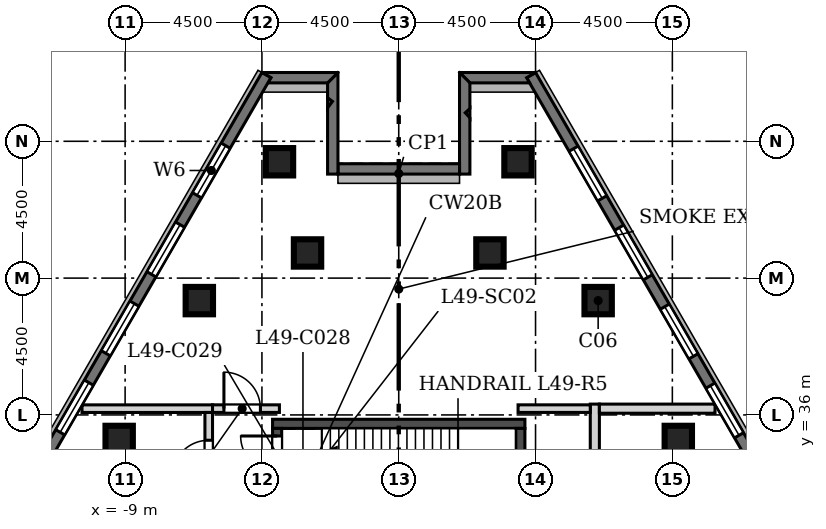
"""IFC4 building model, lengths in metres.
Left out: names, types, materials, properties, quantities, classifications, styles, units other than length and angle.
Written with IfcOpenShell. Run it as: python <this file> out.ifc"""

import sys

from ifc_helpers import new_model, si_unit, direction, frame, frame_2d, origin, origin_2d, place, context, subcontext, project, spatial, polyline, rectangle, outline, extrude, element, fill, save


model = new_model("IFC4")
c1 = context("Model", 3, precision=1e-05, world=origin(), true_north=direction((0.0, 1.0)))
c2 = subcontext(c1, "Body", "Model", "MODEL_VIEW")
j1 = project(units=[si_unit("LENGTHUNIT", "METRE"), si_unit("PLANEANGLEUNIT", "RADIAN")], contexts=[c1])
p1 = place(None, origin())
s1 = spatial("IfcSite", under=j1, at=p1, CompositionType="ELEMENT")
p2 = place(p1, origin())
s2 = spatial("IfcBuilding", under=s1, at=p2, CompositionType="ELEMENT")
p3 = place(p2, frame((0.0, 0.0, 218.1)))
s3 = spatial("IfcBuildingStorey", under=s2, at=p3, CompositionType="ELEMENT", Elevation=218.1)
for number, where, z_axis, x_axis in (
    (1, (9.196, 35.194, 0.0), (0.0, 0.0, 1.0), (1.0, 0.0, 0.0)),
    (2, (6.559, 39.76, 0.0), (0.0, 0.0, 1.0), (1.0, 0.0, 0.0)),
    (3, (3.923, 44.327, 0.0), (0.0, 0.0, 1.0), (1.0, 0.0, 0.0)),
    (4, (3.0, 41.327, 0.0), (0.0, 0.0, 1.0), (1.0, 0.0, 0.0)),
    (5, (-3.0, 41.327, 0.0), (0.0, 0.0, 1.0), (1.0, 0.0, 0.0)),
    (6, (-3.923, 44.327, 0.0), (0.0, 0.0, 1.0), (1.0, 0.0, 0.0)),
    (7, (-6.559, 39.76, 0.0), (0.0, 0.0, 1.0), (1.0, 0.0, 0.0)),
    (8, (-9.196, 35.194, 0.0), (0.0, 0.0, 1.0), (1.0, 0.0, 0.0)),
):
    element("IfcColumn", number, at=place(p3, frame(where, z_axis=z_axis, x_axis=x_axis)), inside=s3, PredefinedType="COLUMN", context=c2, shape_type="SweptSolid", body=[
        extrude(rectangle(XDim=0.9, YDim=0.9, at=origin_2d()), origin(), (0.0, 0.0, 1.0), 5.4),
    ])
p4 = place(p3, frame((27.139, 7.709, 0.0), z_axis=(0.0, 0.0, 1.0), x_axis=(-0.500000533701, 0.866025095652, 0.0)))
e9 = element("IfcWall", 9, at=p4, inside=s3, PredefinedType="SOLIDWALL", context=c2, shape_type="SweptSolid", body=[
    extrude(rectangle(XDim=45.573, YDim=0.34, at=frame_2d((22.787, 0.0))), origin(), (0.0, 0.0, 1.0), 5.0),
])
p5 = place(p4, frame((1.893, 0.0, 0.9)))
e10 = element("IfcOpeningElement", 10, at=p5, cuts=e9, PredefinedType="OPENING", context=c2, shape_type="SweptSolid", body=[
    extrude(rectangle(XDim=1.885, YDim=3.0, at=frame_2d((0.942, 1.5))), frame((0.0, 0.18, 0.0), z_axis=(0.0, -1.0, 0.0), x_axis=(1.0, 0.0, 0.0)), (0.0, 0.0, 1.0), 0.36),
])
p6 = place(p4, frame((4.893, 0.0, 0.9)))
e11 = element("IfcOpeningElement", 11, at=p6, cuts=e9, PredefinedType="OPENING", context=c2, shape_type="SweptSolid", body=[
    extrude(rectangle(XDim=1.885, YDim=3.0, at=frame_2d((0.942, 1.5))), frame((0.0, 0.18, 0.0), z_axis=(0.0, -1.0, 0.0), x_axis=(1.0, 0.0, 0.0)), (0.0, 0.0, 1.0), 0.36),
])
p7 = place(p4, frame((7.893, 0.0, 0.9)))
e12 = element("IfcOpeningElement", 12, at=p7, cuts=e9, PredefinedType="OPENING", context=c2, shape_type="SweptSolid", body=[
    extrude(rectangle(XDim=1.885, YDim=3.0, at=frame_2d((0.942, 1.5))), frame((0.0, 0.18, 0.0), z_axis=(0.0, -1.0, 0.0), x_axis=(1.0, 0.0, 0.0)), (0.0, 0.0, 1.0), 0.36),
])
p8 = place(p4, frame((10.893, 0.0, 0.9)))
e13 = element("IfcOpeningElement", 13, at=p8, cuts=e9, PredefinedType="OPENING", context=c2, shape_type="SweptSolid", body=[
    extrude(rectangle(XDim=1.885, YDim=3.0, at=frame_2d((0.942, 1.5))), frame((0.0, 0.18, 0.0), z_axis=(0.0, -1.0, 0.0), x_axis=(1.0, 0.0, 0.0)), (0.0, 0.0, 1.0), 0.36),
])
p9 = place(p4, frame((13.893, 0.0, 0.9)))
e14 = element("IfcOpeningElement", 14, at=p9, cuts=e9, PredefinedType="OPENING", context=c2, shape_type="SweptSolid", body=[
    extrude(rectangle(XDim=1.885, YDim=3.0, at=frame_2d((0.942, 1.5))), frame((0.0, 0.18, 0.0), z_axis=(0.0, -1.0, 0.0), x_axis=(1.0, 0.0, 0.0)), (0.0, 0.0, 1.0), 0.36),
])
p10 = place(p4, frame((16.893, 0.0, 0.9)))
e15 = element("IfcOpeningElement", 15, at=p10, cuts=e9, PredefinedType="OPENING", context=c2, shape_type="SweptSolid", body=[
    extrude(rectangle(XDim=1.885, YDim=3.0, at=frame_2d((0.942, 1.5))), frame((0.0, 0.18, 0.0), z_axis=(0.0, -1.0, 0.0), x_axis=(1.0, 0.0, 0.0)), (0.0, 0.0, 1.0), 0.36),
])
p11 = place(p4, frame((19.893, 0.0, 0.9)))
e16 = element("IfcOpeningElement", 16, at=p11, cuts=e9, PredefinedType="OPENING", context=c2, shape_type="SweptSolid", body=[
    extrude(rectangle(XDim=1.885, YDim=3.0, at=frame_2d((0.942, 1.5))), frame((0.0, 0.18, 0.0), z_axis=(0.0, -1.0, 0.0), x_axis=(1.0, 0.0, 0.0)), (0.0, 0.0, 1.0), 0.36),
])
p12 = place(p4, frame((22.893, 0.0, 0.9)))
e17 = element("IfcOpeningElement", 17, at=p12, cuts=e9, PredefinedType="OPENING", context=c2, shape_type="SweptSolid", body=[
    extrude(rectangle(XDim=1.885, YDim=3.0, at=frame_2d((0.942, 1.5))), frame((0.0, 0.18, 0.0), z_axis=(0.0, -1.0, 0.0), x_axis=(1.0, 0.0, 0.0)), (0.0, 0.0, 1.0), 0.36),
])
p13 = place(p4, frame((25.893, 0.0, 0.9)))
e18 = element("IfcOpeningElement", 18, at=p13, cuts=e9, PredefinedType="OPENING", context=c2, shape_type="SweptSolid", body=[
    extrude(rectangle(XDim=1.885, YDim=3.0, at=frame_2d((0.942, 1.5))), frame((0.0, 0.18, 0.0), z_axis=(0.0, -1.0, 0.0), x_axis=(1.0, 0.0, 0.0)), (0.0, 0.0, 1.0), 0.36),
])
p14 = place(p4, frame((28.893, 0.0, 0.9)))
e19 = element("IfcOpeningElement", 19, at=p14, cuts=e9, PredefinedType="OPENING", context=c2, shape_type="SweptSolid", body=[
    extrude(rectangle(XDim=1.885, YDim=3.0, at=frame_2d((0.942, 1.5))), frame((0.0, 0.18, 0.0), z_axis=(0.0, -1.0, 0.0), x_axis=(1.0, 0.0, 0.0)), (0.0, 0.0, 1.0), 0.36),
])
p15 = place(p4, frame((31.893, 0.0, 0.9)))
e20 = element("IfcOpeningElement", 20, at=p15, cuts=e9, PredefinedType="OPENING", context=c2, shape_type="SweptSolid", body=[
    extrude(rectangle(XDim=1.885, YDim=3.0, at=frame_2d((0.942, 1.5))), frame((0.0, 0.18, 0.0), z_axis=(0.0, -1.0, 0.0), x_axis=(1.0, 0.0, 0.0)), (0.0, 0.0, 1.0), 0.36),
])
p16 = place(p4, frame((34.893, 0.0, 0.9)))
e21 = element("IfcOpeningElement", 21, at=p16, cuts=e9, PredefinedType="OPENING", context=c2, shape_type="SweptSolid", body=[
    extrude(rectangle(XDim=1.885, YDim=3.0, at=frame_2d((0.942, 1.5))), frame((0.0, 0.18, 0.0), z_axis=(0.0, -1.0, 0.0), x_axis=(1.0, 0.0, 0.0)), (0.0, 0.0, 1.0), 0.36),
])
p17 = place(p4, frame((37.893, 0.0, 0.9)))
e22 = element("IfcOpeningElement", 22, at=p17, cuts=e9, PredefinedType="OPENING", context=c2, shape_type="SweptSolid", body=[
    extrude(rectangle(XDim=1.885, YDim=3.0, at=frame_2d((0.942, 1.5))), frame((0.0, 0.18, 0.0), z_axis=(0.0, -1.0, 0.0), x_axis=(1.0, 0.0, 0.0)), (0.0, 0.0, 1.0), 0.36),
])
p18 = place(p4, frame((40.893, 0.0, 0.9)))
e23 = element("IfcOpeningElement", 23, at=p18, cuts=e9, PredefinedType="OPENING", context=c2, shape_type="SweptSolid", body=[
    extrude(rectangle(XDim=1.885, YDim=3.0, at=frame_2d((0.942, 1.5))), frame((0.0, 0.18, 0.0), z_axis=(0.0, -1.0, 0.0), x_axis=(1.0, 0.0, 0.0)), (0.0, 0.0, 1.0), 0.36),
])
p19 = place(p3, origin())
e24 = element("IfcWall", 24, at=p19, inside=s3, PredefinedType="SOLIDWALL", context=c2, shape_type="SweptSolid", body=[
    extrude(outline(polyline([(1.999, 47.262), (4.501, 47.262), (4.501, 47.262), (4.206, 47.091), (4.305, 46.921), (2.34, 46.921), (1.999, 47.262), (1.999, 47.262)])), origin(), (0.0, 0.0, 1.0), 5.0),
])
p20 = place(p3, origin())
e25 = element("IfcWall", 25, at=p20, inside=s3, PredefinedType="SOLIDWALL", context=c2, shape_type="SweptSolid", body=[
    extrude(outline(polyline([(2.341, 45.771), (2.188, 45.938), (2.341, 46.077), (2.341, 45.771)])), origin(), (0.0, 0.0, 1.0), 4.4),
])
p21 = place(p3, origin())
e26 = element("IfcWall", 26, at=p21, inside=s3, PredefinedType="SOLIDWALL", context=c2, shape_type="SweptSolid", body=[
    extrude(outline(polyline([(2.0, 43.921), (2.0, 47.263), (2.0, 47.263), (2.341, 46.922), (2.341, 46.077), (2.188, 45.938), (2.341, 45.771), (2.341, 43.921), (2.0, 43.921)])), origin(), (0.0, 0.0, 1.0), 5.0),
])
p22 = place(p3, frame((2.0, 44.092, 0.0), z_axis=(0.0, 0.0, 1.0), x_axis=(-1.0, 0.0, 0.0)))
e27 = element("IfcWall", 27, at=p22, inside=s3, PredefinedType="SOLIDWALL", context=c2, shape_type="SweptSolid", body=[
    extrude(rectangle(XDim=4.0, YDim=0.34, at=frame_2d((2.0, 0.0))), origin(), (0.0, 0.0, 1.0), 5.0),
])
p23 = place(p3, origin())
e28 = element("IfcWall", 28, at=p23, inside=s3, PredefinedType="SOLIDWALL", context=c2, shape_type="SweptSolid", body=[
    extrude(outline(polyline([(-2.341, 46.432), (-2.18, 46.312), (-2.341, 46.098), (-2.341, 46.432)])), origin(), (0.0, 0.0, 1.0), 4.4),
])
p24 = place(p3, origin())
e29 = element("IfcWall", 29, at=p24, inside=s3, PredefinedType="SOLIDWALL", context=c2, shape_type="SweptSolid", body=[
    extrude(outline(polyline([(-2.0, 43.921), (-2.341, 43.921), (-2.341, 46.098), (-2.18, 46.312), (-2.341, 46.432), (-2.341, 46.922), (-2.0, 47.263), (-2.0, 47.263), (-2.0, 43.921)])), origin(), (0.0, 0.0, 1.0), 5.0),
])
p25 = place(p3, origin())
e30 = element("IfcWall", 30, at=p25, inside=s3, PredefinedType="SOLIDWALL", context=c2, shape_type="SweptSolid", body=[
    extrude(outline(polyline([(-4.305, 46.921), (-4.206, 47.091), (-4.501, 47.262), (-4.501, 47.262), (-1.999, 47.262), (-1.999, 47.262), (-2.34, 46.921), (-4.305, 46.921)])), origin(), (0.0, 0.0, 1.0), 5.0),
])
p26 = place(p3, frame((-4.353, 47.177, 0.0), z_axis=(0.0, 0.0, 1.0), x_axis=(-0.500000533701, -0.866025095652, 0.0)))
e31 = element("IfcWall", 31, at=p26, inside=s3, PredefinedType="SOLIDWALL", context=c2, shape_type="SweptSolid", body=[
    extrude(rectangle(XDim=45.573, YDim=0.34, at=frame_2d((22.787, 0.0))), origin(), (0.0, 0.0, 1.0), 5.0),
])
p27 = place(p26, frame((2.68, 0.0, 0.9)))
e32 = element("IfcOpeningElement", 32, at=p27, cuts=e31, PredefinedType="OPENING", context=c2, shape_type="SweptSolid", body=[
    extrude(rectangle(XDim=1.885, YDim=3.0, at=frame_2d((0.942, 1.5))), frame((0.0, 0.18, 0.0), z_axis=(0.0, -1.0, 0.0), x_axis=(1.0, 0.0, 0.0)), (0.0, 0.0, 1.0), 0.36),
])
p28 = place(p26, frame((5.68, 0.0, 0.9)))
e33 = element("IfcOpeningElement", 33, at=p28, cuts=e31, PredefinedType="OPENING", context=c2, shape_type="SweptSolid", body=[
    extrude(rectangle(XDim=1.885, YDim=3.0, at=frame_2d((0.942, 1.5))), frame((0.0, 0.18, 0.0), z_axis=(0.0, -1.0, 0.0), x_axis=(1.0, 0.0, 0.0)), (0.0, 0.0, 1.0), 0.36),
])
p29 = place(p26, frame((8.68, 0.0, 0.9)))
e34 = element("IfcOpeningElement", 34, at=p29, cuts=e31, PredefinedType="OPENING", context=c2, shape_type="SweptSolid", body=[
    extrude(rectangle(XDim=1.885, YDim=3.0, at=frame_2d((0.942, 1.5))), frame((0.0, 0.18, 0.0), z_axis=(0.0, -1.0, 0.0), x_axis=(1.0, 0.0, 0.0)), (0.0, 0.0, 1.0), 0.36),
])
p30 = place(p26, frame((11.68, 0.0, 0.9)))
e35 = element("IfcOpeningElement", 35, at=p30, cuts=e31, PredefinedType="OPENING", context=c2, shape_type="SweptSolid", body=[
    extrude(rectangle(XDim=1.885, YDim=3.0, at=frame_2d((0.942, 1.5))), frame((0.0, 0.18, 0.0), z_axis=(0.0, -1.0, 0.0), x_axis=(1.0, 0.0, 0.0)), (0.0, 0.0, 1.0), 0.36),
])
p31 = place(p26, frame((14.68, 0.0, 0.9)))
e36 = element("IfcOpeningElement", 36, at=p31, cuts=e31, PredefinedType="OPENING", context=c2, shape_type="SweptSolid", body=[
    extrude(rectangle(XDim=1.885, YDim=3.0, at=frame_2d((0.942, 1.5))), frame((0.0, 0.18, 0.0), z_axis=(0.0, -1.0, 0.0), x_axis=(1.0, 0.0, 0.0)), (0.0, 0.0, 1.0), 0.36),
])
p32 = place(p26, frame((17.68, 0.0, 0.9)))
e37 = element("IfcOpeningElement", 37, at=p32, cuts=e31, PredefinedType="OPENING", context=c2, shape_type="SweptSolid", body=[
    extrude(rectangle(XDim=1.885, YDim=3.0, at=frame_2d((0.942, 1.5))), frame((0.0, 0.18, 0.0), z_axis=(0.0, -1.0, 0.0), x_axis=(1.0, 0.0, 0.0)), (0.0, 0.0, 1.0), 0.36),
])
p33 = place(p26, frame((20.68, 0.0, 0.9)))
e38 = element("IfcOpeningElement", 38, at=p33, cuts=e31, PredefinedType="OPENING", context=c2, shape_type="SweptSolid", body=[
    extrude(rectangle(XDim=1.885, YDim=3.0, at=frame_2d((0.942, 1.5))), frame((0.0, 0.18, 0.0), z_axis=(0.0, -1.0, 0.0), x_axis=(1.0, 0.0, 0.0)), (0.0, 0.0, 1.0), 0.36),
])
p34 = place(p26, frame((23.68, 0.0, 0.9)))
e39 = element("IfcOpeningElement", 39, at=p34, cuts=e31, PredefinedType="OPENING", context=c2, shape_type="SweptSolid", body=[
    extrude(rectangle(XDim=1.885, YDim=3.0, at=frame_2d((0.942, 1.5))), frame((0.0, 0.18, 0.0), z_axis=(0.0, -1.0, 0.0), x_axis=(1.0, 0.0, 0.0)), (0.0, 0.0, 1.0), 0.36),
])
p35 = place(p26, frame((26.68, 0.0, 0.9)))
e40 = element("IfcOpeningElement", 40, at=p35, cuts=e31, PredefinedType="OPENING", context=c2, shape_type="SweptSolid", body=[
    extrude(rectangle(XDim=1.885, YDim=3.0, at=frame_2d((0.942, 1.5))), frame((0.0, 0.18, 0.0), z_axis=(0.0, -1.0, 0.0), x_axis=(1.0, 0.0, 0.0)), (0.0, 0.0, 1.0), 0.36),
])
p36 = place(p26, frame((29.68, 0.0, 0.9)))
e41 = element("IfcOpeningElement", 41, at=p36, cuts=e31, PredefinedType="OPENING", context=c2, shape_type="SweptSolid", body=[
    extrude(rectangle(XDim=1.885, YDim=3.0, at=frame_2d((0.942, 1.5))), frame((0.0, 0.18, 0.0), z_axis=(0.0, -1.0, 0.0), x_axis=(1.0, 0.0, 0.0)), (0.0, 0.0, 1.0), 0.36),
])
p37 = place(p26, frame((32.68, 0.0, 0.9)))
e42 = element("IfcOpeningElement", 42, at=p37, cuts=e31, PredefinedType="OPENING", context=c2, shape_type="SweptSolid", body=[
    extrude(rectangle(XDim=1.885, YDim=3.0, at=frame_2d((0.942, 1.5))), frame((0.0, 0.18, 0.0), z_axis=(0.0, -1.0, 0.0), x_axis=(1.0, 0.0, 0.0)), (0.0, 0.0, 1.0), 0.36),
])
p38 = place(p26, frame((35.68, 0.0, 0.9)))
e43 = element("IfcOpeningElement", 43, at=p38, cuts=e31, PredefinedType="OPENING", context=c2, shape_type="SweptSolid", body=[
    extrude(rectangle(XDim=1.885, YDim=3.0, at=frame_2d((0.942, 1.5))), frame((0.0, 0.18, 0.0), z_axis=(0.0, -1.0, 0.0), x_axis=(1.0, 0.0, 0.0)), (0.0, 0.0, 1.0), 0.36),
])
p39 = place(p26, frame((38.68, 0.0, 0.9)))
e44 = element("IfcOpeningElement", 44, at=p39, cuts=e31, PredefinedType="OPENING", context=c2, shape_type="SweptSolid", body=[
    extrude(rectangle(XDim=1.885, YDim=3.0, at=frame_2d((0.942, 1.5))), frame((0.0, 0.18, 0.0), z_axis=(0.0, -1.0, 0.0), x_axis=(1.0, 0.0, 0.0)), (0.0, 0.0, 1.0), 0.36),
])
p40 = place(p26, frame((41.68, 0.0, 0.9)))
e45 = element("IfcOpeningElement", 45, at=p40, cuts=e31, PredefinedType="OPENING", context=c2, shape_type="SweptSolid", body=[
    extrude(rectangle(XDim=1.885, YDim=3.0, at=frame_2d((0.942, 1.5))), frame((0.0, 0.18, 0.0), z_axis=(0.0, -1.0, 0.0), x_axis=(1.0, 0.0, 0.0)), (0.0, 0.0, 1.0), 0.36),
])
p41 = place(p3, frame((-4.15, 35.707, -0.4), z_axis=(0.0, 0.0, 1.0), x_axis=(1.0, 0.0, 0.0)))
e46 = element("IfcWall", 46, at=p41, inside=s3, PredefinedType="SOLIDWALL", context=c2, shape_type="SweptSolid", body=[
    extrude(rectangle(XDim=8.3, YDim=0.3, at=frame_2d((4.15, 0.0))), origin(), (0.0, 0.0, 1.0), 5.4),
])
p42 = place(p3, frame((-4.0, 29.057, -0.4), z_axis=(0.0, 0.0, 1.0), x_axis=(0.0, 1.0, 0.0)))
e47 = element("IfcWall", 47, at=p42, inside=s3, PredefinedType="SOLIDWALL", context=c2, shape_type="SweptSolid", body=[
    extrude(rectangle(XDim=6.5, YDim=0.3, at=frame_2d((3.25, 0.0))), origin(), (0.0, 0.0, 1.0), 5.4),
])
p43 = place(p42, frame((5.05, 0.0, 0.4)))
e48 = element("IfcOpeningElement", 48, at=p43, cuts=e47, PredefinedType="OPENING", context=c2, shape_type="SweptSolid", body=[
    extrude(rectangle(XDim=1.2, YDim=2.1, at=frame_2d((0.6, 1.05))), frame((0.0, 0.16, 0.0), z_axis=(0.0, -1.0, 0.0), x_axis=(1.0, 0.0, 0.0)), (0.0, 0.0, 1.0), 0.32),
])
p44 = place(p3, frame((4.0, 29.057, -0.4), z_axis=(0.0, 0.0, 1.0), x_axis=(0.0, 1.0, 0.0)))
e49 = element("IfcWall", 49, at=p44, inside=s3, PredefinedType="SOLIDWALL", context=c2, shape_type="SweptSolid", body=[
    extrude(rectangle(XDim=6.5, YDim=0.3, at=frame_2d((3.25, 0.0))), origin(), (0.0, 0.0, 1.0), 5.4),
])
p45 = place(p3, frame((6.45, 36.356, 0.0), z_axis=(0.0, 0.0, 1.0), x_axis=(0.0, -1.0, 0.0)))
e50 = element("IfcWall", 50, at=p45, inside=s3, PredefinedType="SOLIDWALL", context=c2, shape_type="SweptSolid", body=[
    extrude(rectangle(XDim=13.856, YDim=0.3, at=frame_2d((6.928, 0.0))), origin(), (0.0, 0.0, 1.0), 5.0),
])
p46 = place(p3, frame((-6.125, 36.206, 0.0), z_axis=(0.0, 0.0, 1.0), x_axis=(-1.0, 0.0, 0.0)))
e51 = element("IfcWall", 51, at=p46, inside=s3, PredefinedType="SOLIDWALL", context=c2, shape_type="SweptSolid", body=[
    extrude(rectangle(XDim=4.293, YDim=0.25, at=frame_2d((2.146, 0.0))), origin(), (0.0, 0.0, 1.0), 5.0),
])
p47 = place(p3, frame((10.404, 36.206, 0.0), z_axis=(0.0, 0.0, 1.0), x_axis=(-1.0, 0.0, 0.0)))
e52 = element("IfcWall", 52, at=p47, inside=s3, PredefinedType="SOLIDWALL", context=c2, shape_type="SweptSolid", body=[
    extrude(rectangle(XDim=3.804, YDim=0.3, at=frame_2d((1.902, 0.0))), origin(), (0.0, 0.0, 1.0), 5.0),
])
p48 = place(p3, frame((-6.25, 33.053, 0.0), z_axis=(0.0, 0.0, 1.0), x_axis=(0.0, 1.0, 0.0)))
e53 = element("IfcWall", 53, at=p48, inside=s3, PredefinedType="SOLIDWALL", context=c2, shape_type="SweptSolid", body=[
    extrude(rectangle(XDim=3.028, YDim=0.25, at=frame_2d((1.514, 0.0))), origin(), (0.0, 0.0, 1.0), 5.0),
])
p49 = place(p48, frame((0.914, 0.0, 0.0)))
e54 = element("IfcOpeningElement", 54, at=p49, cuts=e53, PredefinedType="OPENING", context=c2, shape_type="SweptSolid", body=[
    extrude(rectangle(XDim=1.2, YDim=2.1, at=frame_2d((0.6, 1.05))), frame((0.0, 0.135, 0.0), z_axis=(0.0, -1.0, 0.0), x_axis=(1.0, 0.0, 0.0)), (0.0, 0.0, 1.0), 0.27),
])
p50 = place(p3, frame((3.925, 36.207, 0.0), z_axis=(0.0, 0.0, 1.0), x_axis=(1.0, 0.0, 0.0)))
e55 = element("IfcWall", 55, at=p50, inside=s3, PredefinedType="SOLIDWALL", context=c2, shape_type="SweptSolid", body=[
    extrude(rectangle(XDim=2.375, YDim=0.25, at=frame_2d((1.188, 0.0))), origin(), (0.0, 0.0, 1.0), 5.0),
])
p51 = place(p3, frame((-6.125, 36.207, 0.0), z_axis=(0.0, 0.0, 1.0), x_axis=(1.0, 0.0, 0.0)))
e56 = element("IfcWall", 56, at=p51, inside=s3, PredefinedType="SOLIDWALL", context=c2, shape_type="SweptSolid", body=[
    extrude(rectangle(XDim=2.2, YDim=0.25, at=frame_2d((1.1, 0.0))), origin(), (0.0, 0.0, 1.0), 5.0),
])
p52 = place(p51, frame((0.375, 0.0, 0.0)))
e57 = element("IfcOpeningElement", 57, at=p52, cuts=e56, PredefinedType="OPENING", context=c2, shape_type="SweptSolid", body=[
    extrude(rectangle(XDim=1.2, YDim=2.1, at=frame_2d((0.6, 1.05))), frame((0.0, 0.135, 0.0), z_axis=(0.0, -1.0, 0.0), x_axis=(1.0, 0.0, 0.0)), (0.0, 0.0, 1.0), 0.27),
])
p53 = place(p15, origin())
e58 = element("IfcWindow", 58, at=p53, inside=s3, PartitioningType="SINGLE_PANEL", PredefinedType="WINDOW", context=c2, shape_type="SweptSolid", body=[
    extrude(rectangle(XDim=1.885, YDim=3.0, at=frame_2d((0.942, 1.5))), frame((0.0, 0.11, 0.0), z_axis=(0.0, -1.0, 0.0), x_axis=(1.0, 0.0, 0.0)), (0.0, 0.0, 1.0), 0.06),
])
fill(e20, e58)
p54 = place(p16, origin())
e59 = element("IfcWindow", 59, at=p54, inside=s3, PartitioningType="SINGLE_PANEL", PredefinedType="WINDOW", context=c2, shape_type="SweptSolid", body=[
    extrude(rectangle(XDim=1.885, YDim=3.0, at=frame_2d((0.942, 1.5))), frame((0.0, 0.11, 0.0), z_axis=(0.0, -1.0, 0.0), x_axis=(1.0, 0.0, 0.0)), (0.0, 0.0, 1.0), 0.06),
])
fill(e21, e59)
p55 = place(p17, origin())
e60 = element("IfcWindow", 60, at=p55, inside=s3, PartitioningType="SINGLE_PANEL", PredefinedType="WINDOW", context=c2, shape_type="SweptSolid", body=[
    extrude(rectangle(XDim=1.885, YDim=3.0, at=frame_2d((0.942, 1.5))), frame((0.0, 0.11, 0.0), z_axis=(0.0, -1.0, 0.0), x_axis=(1.0, 0.0, 0.0)), (0.0, 0.0, 1.0), 0.06),
])
fill(e22, e60)
p56 = place(p18, origin())
e61 = element("IfcWindow", 61, at=p56, inside=s3, PartitioningType="SINGLE_PANEL", PredefinedType="WINDOW", context=c2, shape_type="SweptSolid", body=[
    extrude(rectangle(XDim=1.885, YDim=3.0, at=frame_2d((0.942, 1.5))), frame((0.0, 0.11, 0.0), z_axis=(0.0, -1.0, 0.0), x_axis=(1.0, 0.0, 0.0)), (0.0, 0.0, 1.0), 0.06),
])
fill(e23, e61)
p57 = place(p27, origin())
e62 = element("IfcWindow", 62, at=p57, inside=s3, PartitioningType="SINGLE_PANEL", PredefinedType="WINDOW", context=c2, shape_type="SweptSolid", body=[
    extrude(rectangle(XDim=1.885, YDim=3.0, at=frame_2d((0.942, 1.5))), frame((0.0, 0.11, 0.0), z_axis=(0.0, -1.0, 0.0), x_axis=(1.0, 0.0, 0.0)), (0.0, 0.0, 1.0), 0.06),
])
fill(e32, e62)
p58 = place(p28, origin())
e63 = element("IfcWindow", 63, at=p58, inside=s3, PartitioningType="SINGLE_PANEL", PredefinedType="WINDOW", context=c2, shape_type="SweptSolid", body=[
    extrude(rectangle(XDim=1.885, YDim=3.0, at=frame_2d((0.942, 1.5))), frame((0.0, 0.11, 0.0), z_axis=(0.0, -1.0, 0.0), x_axis=(1.0, 0.0, 0.0)), (0.0, 0.0, 1.0), 0.06),
])
fill(e33, e63)
p59 = place(p29, origin())
e64 = element("IfcWindow", 64, at=p59, inside=s3, PartitioningType="SINGLE_PANEL", PredefinedType="WINDOW", context=c2, shape_type="SweptSolid", body=[
    extrude(rectangle(XDim=1.885, YDim=3.0, at=frame_2d((0.942, 1.5))), frame((0.0, 0.11, 0.0), z_axis=(0.0, -1.0, 0.0), x_axis=(1.0, 0.0, 0.0)), (0.0, 0.0, 1.0), 0.06),
])
fill(e34, e64)
p60 = place(p30, origin())
e65 = element("IfcWindow", 65, at=p60, inside=s3, PartitioningType="SINGLE_PANEL", PredefinedType="WINDOW", context=c2, shape_type="SweptSolid", body=[
    extrude(rectangle(XDim=1.885, YDim=3.0, at=frame_2d((0.942, 1.5))), frame((0.0, 0.11, 0.0), z_axis=(0.0, -1.0, 0.0), x_axis=(1.0, 0.0, 0.0)), (0.0, 0.0, 1.0), 0.06),
])
fill(e35, e65)
p61 = place(p43, origin())
e66 = element("IfcDoor", 66, at=p61, inside=s3, OperationType="SINGLE_SWING_RIGHT", PredefinedType="DOOR", context=c2, shape_type="SweptSolid", body=[
    extrude(rectangle(XDim=1.2, YDim=2.1, at=frame_2d((0.6, 1.05))), frame((0.0, 0.025, 0.0), z_axis=(0.0, -1.0, 0.0), x_axis=(1.0, 0.0, 0.0)), (0.0, 0.0, 1.0), 0.05),
])
fill(e48, e66)
p62 = place(p52, origin())
e67 = element("IfcDoor", 67, at=p62, inside=s3, OperationType="SINGLE_SWING_LEFT", PredefinedType="DOOR", context=c2, shape_type="SweptSolid", body=[
    extrude(rectangle(XDim=1.2, YDim=2.1, at=frame_2d((0.6, 1.05))), frame((0.0, 0.025, 0.0), z_axis=(0.0, -1.0, 0.0), x_axis=(1.0, 0.0, 0.0)), (0.0, 0.0, 1.0), 0.05),
])
fill(e57, e67)
p63 = place(p49, origin())
e68 = element("IfcDoor", 68, at=p63, inside=s3, OperationType="SINGLE_SWING_LEFT", PredefinedType="DOOR", context=c2, shape_type="SweptSolid", body=[
    extrude(rectangle(XDim=1.2, YDim=2.1, at=frame_2d((0.6, 1.05))), frame((0.0, 0.025, 0.0), z_axis=(0.0, -1.0, 0.0), x_axis=(1.0, 0.0, 0.0)), (0.0, 0.0, 1.0), 0.05),
])
fill(e54, e68)
save(model, sys.argv[1])
